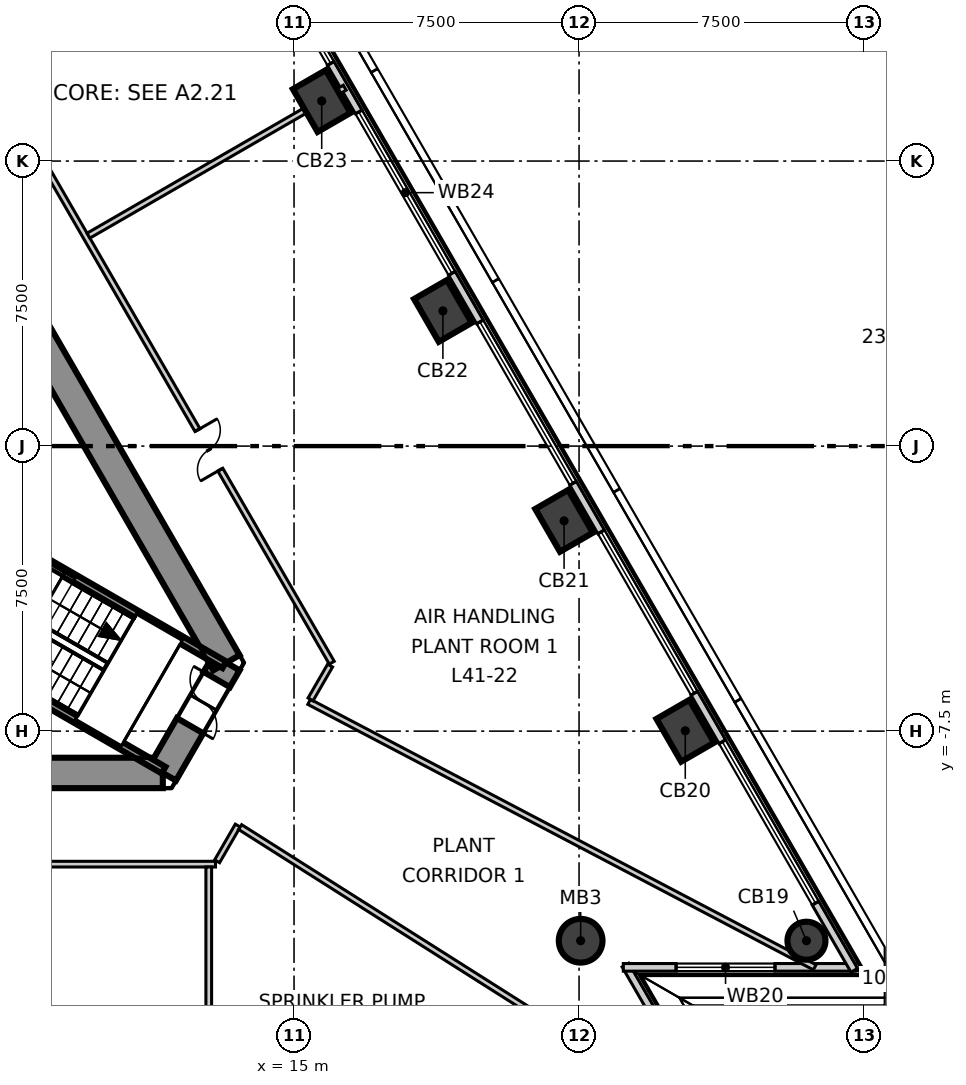
"""IFC4 building model, lengths in metres.
Left out: names, types, materials, properties, quantities, classifications, styles, units other than length and angle.
Written with IfcOpenShell. Run it as: python <this file> out.ifc"""

import sys

from ifc_helpers import new_model, si_unit, direction, frame, frame_2d, origin, origin_2d, place, context, subcontext, project, spatial, polyline, rectangle, circle, outline, extrude, element, fill, save


model = new_model("IFC4")
c1 = context("Model", 3, precision=1e-05, world=origin(), true_north=direction((0.0, 1.0)))
c2 = subcontext(c1, "Body", "Model", "MODEL_VIEW")
j1 = project(units=[si_unit("LENGTHUNIT", "METRE"), si_unit("PLANEANGLEUNIT", "RADIAN")], contexts=[c1])
p1 = place(None, origin())
s1 = spatial("IfcSite", under=j1, at=p1, CompositionType="ELEMENT")
p2 = place(p1, origin())
s2 = spatial("IfcBuilding", under=s1, at=p2, CompositionType="ELEMENT")
p3 = place(p2, frame((0.0, 0.0, 176.3)))
s3 = spatial("IfcBuildingStorey", under=s2, at=p3, CompositionType="ELEMENT", Elevation=176.3)
p4 = place(p3, frame((-11.547, -8.6, -0.3), z_axis=(0.0, 0.0, 1.0), x_axis=(1.0, 0.0, 0.0)))
e1 = element("IfcWall", 1, at=p4, inside=s3, PredefinedType="SHEAR", context=c2, shape_type="SweptSolid", body=[
    extrude(outline(polyline([(-0.231, -0.4), (1.732, -0.4), (3.695, -0.4), (5.658, -0.4), (7.621, -0.4), (9.584, -0.4), (11.547, -0.4), (13.51, -0.4), (15.473, -0.4), (17.436, -0.4), (19.399, -0.4), (21.362, -0.4), (23.325, -0.4), (22.863, 0.4), (20.977, 0.4), (19.091, 0.4), (17.205, 0.4), (15.319, 0.4), (13.433, 0.4), (11.547, 0.4), (9.661, 0.4), (7.775, 0.4), (5.889, 0.4), (4.003, 0.4), (2.117, 0.4), (0.231, 0.4), (-0.231, -0.4)])), origin(), (0.0, 0.0, 1.0), 4.2),
])
p5 = place(p3, frame((11.547, -8.6, -0.3), z_axis=(0.0, 0.0, 1.0), x_axis=(0.49987182685, 0.866099391942, 0.0)))
e2 = element("IfcWall", 2, at=p5, inside=s3, PredefinedType="SHEAR", context=c2, shape_type="SweptSolid", body=[
    extrude(outline(polyline([(-0.231, -0.4), (1.674, -0.4), (3.579, -0.4), (3.118, 0.4), (1.674, 0.4), (0.231, 0.4), (-0.231, -0.4)])), origin(), (0.0, 0.0, 1.0), 4.2),
])
p6 = place(p5, frame((1.437, 0.0, 0.3)))
e3 = element("IfcOpeningElement", 3, at=p6, cuts=e2, PredefinedType="OPENING", context=c2, shape_type="SweptSolid", body=[
    extrude(rectangle(XDim=1.4, YDim=2.1, at=frame_2d((0.7, 1.05))), frame((0.0, 0.41, 0.0), z_axis=(0.0, -1.0, 0.0), x_axis=(1.0, 0.0, 0.0)), (0.0, 0.0, 1.0), 0.82),
])
p7 = place(p3, frame((13.221, -5.7, -0.3), z_axis=(0.0, 0.0, 1.0), x_axis=(-0.499995765644, 0.866027848477, 0.0)))
e4 = element("IfcWall", 4, at=p7, inside=s3, PredefinedType="SHEAR", context=c2, shape_type="SweptSolid", body=[
    extrude(outline(polyline([(-0.231, -0.4), (1.732, -0.4), (3.695, -0.4), (5.658, -0.4), (7.621, -0.4), (9.584, -0.4), (11.547, -0.4), (13.51, -0.4), (15.473, -0.4), (17.436, -0.4), (19.399, -0.4), (21.362, -0.4), (23.325, -0.4), (22.863, 0.4), (20.977, 0.4), (19.091, 0.4), (17.205, 0.4), (15.319, 0.4), (13.433, 0.4), (11.547, 0.4), (9.661, 0.4), (7.775, 0.4), (5.889, 0.4), (4.003, 0.4), (2.117, 0.4), (0.231, 0.4), (-0.231, -0.4)])), origin(), (0.0, 0.0, 1.0), 4.2),
])
p8 = place(p7, frame((10.647, 0.0, 0.3)))
e5 = element("IfcOpeningElement", 5, at=p8, cuts=e4, PredefinedType="OPENING", context=c2, shape_type="SweptSolid", body=[
    extrude(rectangle(XDim=1.8, YDim=2.1, at=frame_2d((0.9, 1.05))), frame((0.0, 0.41, 0.0), z_axis=(0.0, -1.0, 0.0), x_axis=(1.0, 0.0, 0.0)), (0.0, 0.0, 1.0), 0.82),
])
p9 = place(p3, frame((28.484, -13.015, -0.3), z_axis=(0.0, 0.0, 1.0), x_axis=(-0.5, 0.866025403784, 0.0)))
e6 = element("IfcColumn", 6, at=p9, inside=s3, PredefinedType="COLUMN", context=c2, shape_type="SweptSolid", body=[
    extrude(circle(Radius=0.5, at=origin_2d()), origin(), (0.0, 0.0, 1.0), 4.2),
])
for number, where, z_axis, x_axis in (
    (7, (25.295, -7.491, -0.3), (0.0, 0.0, 1.0), (-0.5, 0.866, 0.0)),
    (8, (22.106, -1.967, -0.3), (0.0, 0.0, 1.0), (-0.5, 0.866, 0.0)),
    (9, (18.917, 3.557, -0.3), (0.0, 0.0, 1.0), (-0.5, 0.866, 0.0)),
    (10, (15.728, 9.08, -0.3), (0.0, 0.0, 1.0), (-0.5, 0.866, 0.0)),
):
    element("IfcColumn", number, at=place(p3, frame(where, z_axis=z_axis, x_axis=x_axis)), inside=s3, PredefinedType="COLUMN", context=c2, shape_type="SweptSolid", body=[
        extrude(rectangle(XDim=1.3, YDim=1.0, at=origin_2d()), origin(), (0.0, 0.0, 1.0), 4.2),
    ])
p10 = place(p3, frame((22.542, -13.015, -0.3), z_axis=(0.0, 0.0, 1.0), x_axis=(1.0, 0.0, 0.0)))
e11 = element("IfcColumn", 11, at=p10, inside=s3, PredefinedType="COLUMN", context=c2, shape_type="SweptSolid", body=[
    extrude(circle(Radius=0.575, at=origin_2d()), origin(), (0.0, 0.0, 1.0), 4.2),
])
p11 = place(p3, frame((26.771, -18.939, 0.0), z_axis=(0.0, 0.0, 1.0), x_axis=(-0.499972956414, 0.866041016843, 0.0)))
e12 = element("IfcWall", 12, at=p11, inside=s3, PredefinedType="ELEMENTEDWALL", context=c2, shape_type="SweptSolid", body=[
    extrude(rectangle(XDim=6.102, YDim=0.2, at=frame_2d((3.051, 0.0))), origin(), (0.0, 0.0, 1.0), 3.9),
])
p12 = place(p11, frame((1.99, 0.0, 0.9)))
e13 = element("IfcOpeningElement", 13, at=p12, cuts=e12, PredefinedType="OPENING", context=c2, shape_type="SweptSolid", body=[
    extrude(rectangle(XDim=2.6, YDim=2.5, at=frame_2d((1.3, 1.25))), frame((0.0, 0.11, 0.0), z_axis=(0.0, -1.0, 0.0), x_axis=(1.0, 0.0, 0.0)), (0.0, 0.0, 1.0), 0.22),
])
p13 = place(p3, frame((23.665, -13.715, 0.0), z_axis=(0.0, 0.0, 1.0), x_axis=(1.0, 0.0, 0.0)))
e14 = element("IfcWall", 14, at=p13, inside=s3, PredefinedType="ELEMENTEDWALL", context=c2, shape_type="SweptSolid", body=[
    extrude(rectangle(XDim=6.102, YDim=0.2, at=frame_2d((3.051, 0.0))), origin(), (0.0, 0.0, 1.0), 3.9),
])
p14 = place(p13, frame((1.39, 0.0, 0.9)))
e15 = element("IfcOpeningElement", 15, at=p14, cuts=e14, PredefinedType="OPENING", context=c2, shape_type="SweptSolid", body=[
    extrude(rectangle(XDim=2.6, YDim=2.5, at=frame_2d((1.3, 1.25))), frame((0.0, 0.11, 0.0), z_axis=(0.0, -1.0, 0.0), x_axis=(1.0, 0.0, 0.0)), (0.0, 0.0, 1.0), 0.22),
])
p15 = place(p3, frame((29.742, -13.793, 0.0), z_axis=(0.0, 0.0, 1.0), x_axis=(-0.499994049952, 0.866028839019, 0.0)))
e16 = element("IfcWall", 16, at=p15, inside=s3, PredefinedType="ELEMENTEDWALL", context=c2, shape_type="SweptSolid", body=[
    extrude(rectangle(XDim=53.613, YDim=0.2, at=frame_2d((26.806, 0.0))), origin(), (0.0, 0.0, 1.0), 3.9),
])
p16 = place(p15, frame((2.042, 0.0, 0.9)))
e17 = element("IfcOpeningElement", 17, at=p16, cuts=e16, PredefinedType="OPENING", context=c2, shape_type="SweptSolid", body=[
    extrude(rectangle(XDim=4.9, YDim=2.5, at=frame_2d((2.45, 1.25))), frame((0.0, 0.11, 0.0), z_axis=(0.0, -1.0, 0.0), x_axis=(1.0, 0.0, 0.0)), (0.0, 0.0, 1.0), 0.22),
])
p17 = place(p15, frame((8.42, 0.0, 0.9)))
e18 = element("IfcOpeningElement", 18, at=p17, cuts=e16, PredefinedType="OPENING", context=c2, shape_type="SweptSolid", body=[
    extrude(rectangle(XDim=4.9, YDim=2.5, at=frame_2d((2.45, 1.25))), frame((0.0, 0.11, 0.0), z_axis=(0.0, -1.0, 0.0), x_axis=(1.0, 0.0, 0.0)), (0.0, 0.0, 1.0), 0.22),
])
p18 = place(p15, frame((14.799, 0.0, 0.9)))
e19 = element("IfcOpeningElement", 19, at=p18, cuts=e16, PredefinedType="OPENING", context=c2, shape_type="SweptSolid", body=[
    extrude(rectangle(XDim=4.9, YDim=2.5, at=frame_2d((2.45, 1.25))), frame((0.0, 0.11, 0.0), z_axis=(0.0, -1.0, 0.0), x_axis=(1.0, 0.0, 0.0)), (0.0, 0.0, 1.0), 0.22),
])
p19 = place(p15, frame((21.177, 0.0, 0.9)))
e20 = element("IfcOpeningElement", 20, at=p19, cuts=e16, PredefinedType="OPENING", context=c2, shape_type="SweptSolid", body=[
    extrude(rectangle(XDim=4.9, YDim=2.5, at=frame_2d((2.45, 1.25))), frame((0.0, 0.11, 0.0), z_axis=(0.0, -1.0, 0.0), x_axis=(1.0, 0.0, 0.0)), (0.0, 0.0, 1.0), 0.22),
])
p20 = place(p15, frame((27.555, 0.0, 0.9)))
e21 = element("IfcOpeningElement", 21, at=p20, cuts=e16, PredefinedType="OPENING", context=c2, shape_type="SweptSolid", body=[
    extrude(rectangle(XDim=4.9, YDim=2.5, at=frame_2d((2.45, 1.25))), frame((0.0, 0.11, 0.0), z_axis=(0.0, -1.0, 0.0), x_axis=(1.0, 0.0, 0.0)), (0.0, 0.0, 1.0), 0.22),
])
p21 = place(p15, frame((33.934, 0.0, 0.9)))
e22 = element("IfcOpeningElement", 22, at=p21, cuts=e16, PredefinedType="OPENING", context=c2, shape_type="SweptSolid", body=[
    extrude(rectangle(XDim=4.9, YDim=2.5, at=frame_2d((2.45, 1.25))), frame((0.0, 0.11, 0.0), z_axis=(0.0, -1.0, 0.0), x_axis=(1.0, 0.0, 0.0)), (0.0, 0.0, 1.0), 0.22),
])
p22 = place(p15, frame((40.312, 0.0, 0.9)))
e23 = element("IfcOpeningElement", 23, at=p22, cuts=e16, PredefinedType="OPENING", context=c2, shape_type="SweptSolid", body=[
    extrude(rectangle(XDim=4.9, YDim=2.5, at=frame_2d((2.45, 1.25))), frame((0.0, 0.11, 0.0), z_axis=(0.0, -1.0, 0.0), x_axis=(1.0, 0.0, 0.0)), (0.0, 0.0, 1.0), 0.22),
])
p23 = place(p15, frame((46.691, 0.0, 0.9)))
e24 = element("IfcOpeningElement", 24, at=p23, cuts=e16, PredefinedType="OPENING", context=c2, shape_type="SweptSolid", body=[
    extrude(rectangle(XDim=4.9, YDim=2.5, at=frame_2d((2.45, 1.25))), frame((0.0, 0.11, 0.0), z_axis=(0.0, -1.0, 0.0), x_axis=(1.0, 0.0, 0.0)), (0.0, 0.0, 1.0), 0.22),
])
p24 = place(p3, frame((-12.846, -11.0, 0.0), z_axis=(0.0, 0.0, 1.0), x_axis=(1.0, 0.0, 0.0)))
e25 = element("IfcWall", 25, at=p24, inside=s3, PredefinedType="PARTITIONING", context=c2, shape_type="SweptSolid", body=[
    extrude(rectangle(XDim=25.779, YDim=0.15, at=frame_2d((12.89, 0.0))), origin(), (0.0, 0.0, 1.0), 3.9),
])
p25 = place(p24, frame((5.868, 0.0, 0.0)))
e26 = element("IfcOpeningElement", 26, at=p25, cuts=e25, PredefinedType="OPENING", context=c2, shape_type="SweptSolid", body=[
    extrude(rectangle(XDim=1.2, YDim=2.1, at=frame_2d((0.6, 1.05))), frame((0.0, 0.085, 0.0), z_axis=(0.0, -1.0, 0.0), x_axis=(1.0, 0.0, 0.0)), (0.0, 0.0, 1.0), 0.17),
])
p26 = place(p24, frame((18.624, 0.0, 0.0)))
e27 = element("IfcOpeningElement", 27, at=p26, cuts=e25, PredefinedType="OPENING", context=c2, shape_type="SweptSolid", body=[
    extrude(rectangle(XDim=1.2, YDim=2.1, at=frame_2d((0.6, 1.05))), frame((0.0, 0.085, 0.0), z_axis=(0.0, -1.0, 0.0), x_axis=(1.0, 0.0, 0.0)), (0.0, 0.0, 1.0), 0.17),
])
p27 = place(p3, frame((3.103, 16.625, 0.0), z_axis=(0.0, 0.0, 1.0), x_axis=(0.500016758057, -0.866015728299, 0.0)))
e28 = element("IfcWall", 28, at=p27, inside=s3, PredefinedType="PARTITIONING", context=c2, shape_type="SweptSolid", body=[
    extrude(rectangle(XDim=25.779, YDim=0.15, at=frame_2d((12.889, 0.0))), origin(), (0.0, 0.0, 1.0), 3.9),
])
p28 = place(p27, frame((18.712, 0.0, 0.0)))
e29 = element("IfcOpeningElement", 29, at=p28, cuts=e28, PredefinedType="OPENING", context=c2, shape_type="SweptSolid", body=[
    extrude(rectangle(XDim=1.2, YDim=2.1, at=frame_2d((0.6, 1.05))), frame((0.0, 0.085, 0.0), z_axis=(0.0, -1.0, 0.0), x_axis=(1.0, 0.0, 0.0)), (0.0, 0.0, 1.0), 0.17),
])
p29 = place(p27, frame((5.78, 0.0, 0.0)))
e30 = element("IfcOpeningElement", 30, at=p29, cuts=e28, PredefinedType="OPENING", context=c2, shape_type="SweptSolid", body=[
    extrude(rectangle(XDim=1.2, YDim=2.1, at=frame_2d((0.6, 1.05))), frame((0.0, 0.085, 0.0), z_axis=(0.0, -1.0, 0.0), x_axis=(1.0, 0.0, 0.0)), (0.0, 0.0, 1.0), 0.17),
])
p30 = place(p3, frame((9.591, 5.537, 0.0), z_axis=(0.0, 0.0, 1.0), x_axis=(0.86603676932, 0.499980313799, 0.0)))
e31 = element("IfcWall", 31, at=p30, inside=s3, PredefinedType="PARTITIONING", context=c2, shape_type="SweptSolid", body=[
    extrude(rectangle(XDim=7.786, YDim=0.15, at=frame_2d((3.893, 0.0))), origin(), (0.0, 0.0, 1.0), 3.4),
])
p31 = place(p3, frame((15.398, -6.73, 0.0), z_axis=(0.0, 0.0, 1.0), x_axis=(0.885369312883, -0.464888351978, 0.0)))
e32 = element("IfcWall", 32, at=p31, inside=s3, PredefinedType="PARTITIONING", context=c2, shape_type="SweptSolid", body=[
    extrude(rectangle(XDim=15.025, YDim=0.15, at=frame_2d((7.513, 0.0))), origin(), (0.0, 0.0, 1.0), 3.2),
])
p32 = place(p3, frame((12.976, -10.925, 0.0), z_axis=(0.0, 0.0, 1.0), x_axis=(0.500202653336, 0.865908370208, 0.0)))
e33 = element("IfcWall", 33, at=p32, inside=s3, PredefinedType="PARTITIONING", context=c2, shape_type="SweptSolid", body=[
    extrude(rectangle(XDim=1.085, YDim=0.15, at=frame_2d((0.543, 0.0))), origin(), (0.0, 0.0, 1.0), 3.9),
])
p33 = place(p3, frame((15.435, -6.665, 0.0), z_axis=(0.0, 0.0, 1.0), x_axis=(0.499996600708, 0.866027366358, 0.0)))
e34 = element("IfcWall", 34, at=p33, inside=s3, PredefinedType="PARTITIONING", context=c2, shape_type="SweptSolid", body=[
    extrude(rectangle(XDim=1.028, YDim=0.15, at=frame_2d((0.514, 0.0))), origin(), (0.0, 0.0, 1.0), 3.9),
])
p34 = place(p3, frame((12.756, -18.861, 0.0), z_axis=(0.0, 0.0, 1.0), x_axis=(0.0, 1.0, 0.0)))
e35 = element("IfcWall", 35, at=p34, inside=s3, PredefinedType="PARTITIONING", context=c2, shape_type="SweptSolid", body=[
    extrude(rectangle(XDim=7.786, YDim=0.15, at=frame_2d((3.893, 0.0))), origin(), (0.0, 0.0, 1.0), 3.9),
])
p35 = place(p3, frame((13.582, -10.025, 0.0), z_axis=(0.0, 0.0, 1.0), x_axis=(0.844701192356, -0.535238167205, 0.0)))
e36 = element("IfcWall", 36, at=p35, inside=s3, PredefinedType="PARTITIONING", context=c2, shape_type="SweptSolid", body=[
    extrude(rectangle(XDim=15.012, YDim=0.15, at=frame_2d((7.506, 0.0))), origin(), (0.0, 0.0, 1.0), 3.2),
])
p36 = place(p35, frame((10.717, 0.0, 0.0)))
e37 = element("IfcOpeningElement", 37, at=p36, cuts=e36, PredefinedType="OPENING", context=c2, shape_type="SweptSolid", body=[
    extrude(rectangle(XDim=1.0, YDim=2.1, at=frame_2d((0.5, 1.05))), frame((0.0, 0.085, 0.0), z_axis=(0.0, -1.0, 0.0), x_axis=(1.0, 0.0, 0.0)), (0.0, 0.0, 1.0), 0.17),
])
p37 = place(p3, frame((4.929, -4.693, 0.0), z_axis=(0.0, 0.0, 1.0), x_axis=(0.866005769735, -0.50003400563, 0.0)))
e38 = element("IfcWall", 38, at=p37, inside=s3, PredefinedType="SOLIDWALL", context=c2, shape_type="SweptSolid", body=[
    extrude(rectangle(XDim=7.665, YDim=0.2, at=frame_2d((3.833, 0.0))), origin(), (0.0, 0.0, 1.0), 3.9),
])
p38 = place(p3, frame((6.529, -1.922, 0.0), z_axis=(0.0, 0.0, 1.0), x_axis=(0.866060938598, -0.499938446846, 0.0)))
e39 = element("IfcWall", 39, at=p38, inside=s3, PredefinedType="SOLIDWALL", context=c2, shape_type="SweptSolid", body=[
    extrude(rectangle(XDim=7.665, YDim=0.2, at=frame_2d((3.832, 0.0))), origin(), (0.0, 0.0, 1.0), 3.9),
])
p39 = place(p14, origin())
e40 = element("IfcWindow", 40, at=p39, inside=s3, PartitioningType="SINGLE_PANEL", PredefinedType="WINDOW", context=c2, shape_type="SweptSolid", body=[
    extrude(rectangle(XDim=2.6, YDim=2.5, at=frame_2d((1.3, 1.25))), frame((0.0, 0.03, 0.0), z_axis=(0.0, -1.0, 0.0), x_axis=(1.0, 0.0, 0.0)), (0.0, 0.0, 1.0), 0.06),
])
fill(e15, e40)
p40 = place(p16, origin())
e41 = element("IfcWindow", 41, at=p40, inside=s3, PartitioningType="SINGLE_PANEL", PredefinedType="WINDOW", context=c2, shape_type="SweptSolid", body=[
    extrude(rectangle(XDim=4.9, YDim=2.5, at=frame_2d((2.45, 1.25))), frame((0.0, 0.03, 0.0), z_axis=(0.0, -1.0, 0.0), x_axis=(1.0, 0.0, 0.0)), (0.0, 0.0, 1.0), 0.06),
])
fill(e17, e41)
p41 = place(p17, origin())
e42 = element("IfcWindow", 42, at=p41, inside=s3, PartitioningType="SINGLE_PANEL", PredefinedType="WINDOW", context=c2, shape_type="SweptSolid", body=[
    extrude(rectangle(XDim=4.9, YDim=2.5, at=frame_2d((2.45, 1.25))), frame((0.0, 0.03, 0.0), z_axis=(0.0, -1.0, 0.0), x_axis=(1.0, 0.0, 0.0)), (0.0, 0.0, 1.0), 0.06),
])
fill(e18, e42)
p42 = place(p18, origin())
e43 = element("IfcWindow", 43, at=p42, inside=s3, PartitioningType="SINGLE_PANEL", PredefinedType="WINDOW", context=c2, shape_type="SweptSolid", body=[
    extrude(rectangle(XDim=4.9, YDim=2.5, at=frame_2d((2.45, 1.25))), frame((0.0, 0.03, 0.0), z_axis=(0.0, -1.0, 0.0), x_axis=(1.0, 0.0, 0.0)), (0.0, 0.0, 1.0), 0.06),
])
fill(e19, e43)
p43 = place(p19, origin())
e44 = element("IfcWindow", 44, at=p43, inside=s3, PartitioningType="SINGLE_PANEL", PredefinedType="WINDOW", context=c2, shape_type="SweptSolid", body=[
    extrude(rectangle(XDim=4.9, YDim=2.5, at=frame_2d((2.45, 1.25))), frame((0.0, 0.03, 0.0), z_axis=(0.0, -1.0, 0.0), x_axis=(1.0, 0.0, 0.0)), (0.0, 0.0, 1.0), 0.06),
])
fill(e20, e44)
p44 = place(p20, origin())
e45 = element("IfcWindow", 45, at=p44, inside=s3, PartitioningType="SINGLE_PANEL", PredefinedType="WINDOW", context=c2, shape_type="SweptSolid", body=[
    extrude(rectangle(XDim=4.9, YDim=2.5, at=frame_2d((2.45, 1.25))), frame((0.0, 0.03, 0.0), z_axis=(0.0, -1.0, 0.0), x_axis=(1.0, 0.0, 0.0)), (0.0, 0.0, 1.0), 0.06),
])
fill(e21, e45)
p45 = place(p28, origin())
e46 = element("IfcDoor", 46, at=p45, inside=s3, OperationType="DOUBLE_DOOR_SINGLE_SWING", PredefinedType="DOOR", context=c2, shape_type="SweptSolid", body=[
    extrude(rectangle(XDim=1.2, YDim=2.1, at=frame_2d((0.6, 1.05))), frame((0.0, 0.025, 0.0), z_axis=(0.0, -1.0, 0.0), x_axis=(1.0, 0.0, 0.0)), (0.0, 0.0, 1.0), 0.05),
])
fill(e29, e46)
p46 = place(p6, origin())
e47 = element("IfcDoor", 47, at=p46, inside=s3, OperationType="DOUBLE_DOOR_SINGLE_SWING", PredefinedType="DOOR", context=c2, shape_type="SweptSolid", body=[
    extrude(rectangle(XDim=1.4, YDim=2.1, at=frame_2d((0.7, 1.05))), frame((0.0, 0.025, 0.0), z_axis=(0.0, -1.0, 0.0), x_axis=(1.0, 0.0, 0.0)), (0.0, 0.0, 1.0), 0.05),
])
fill(e3, e47)
save(model, sys.argv[1])
